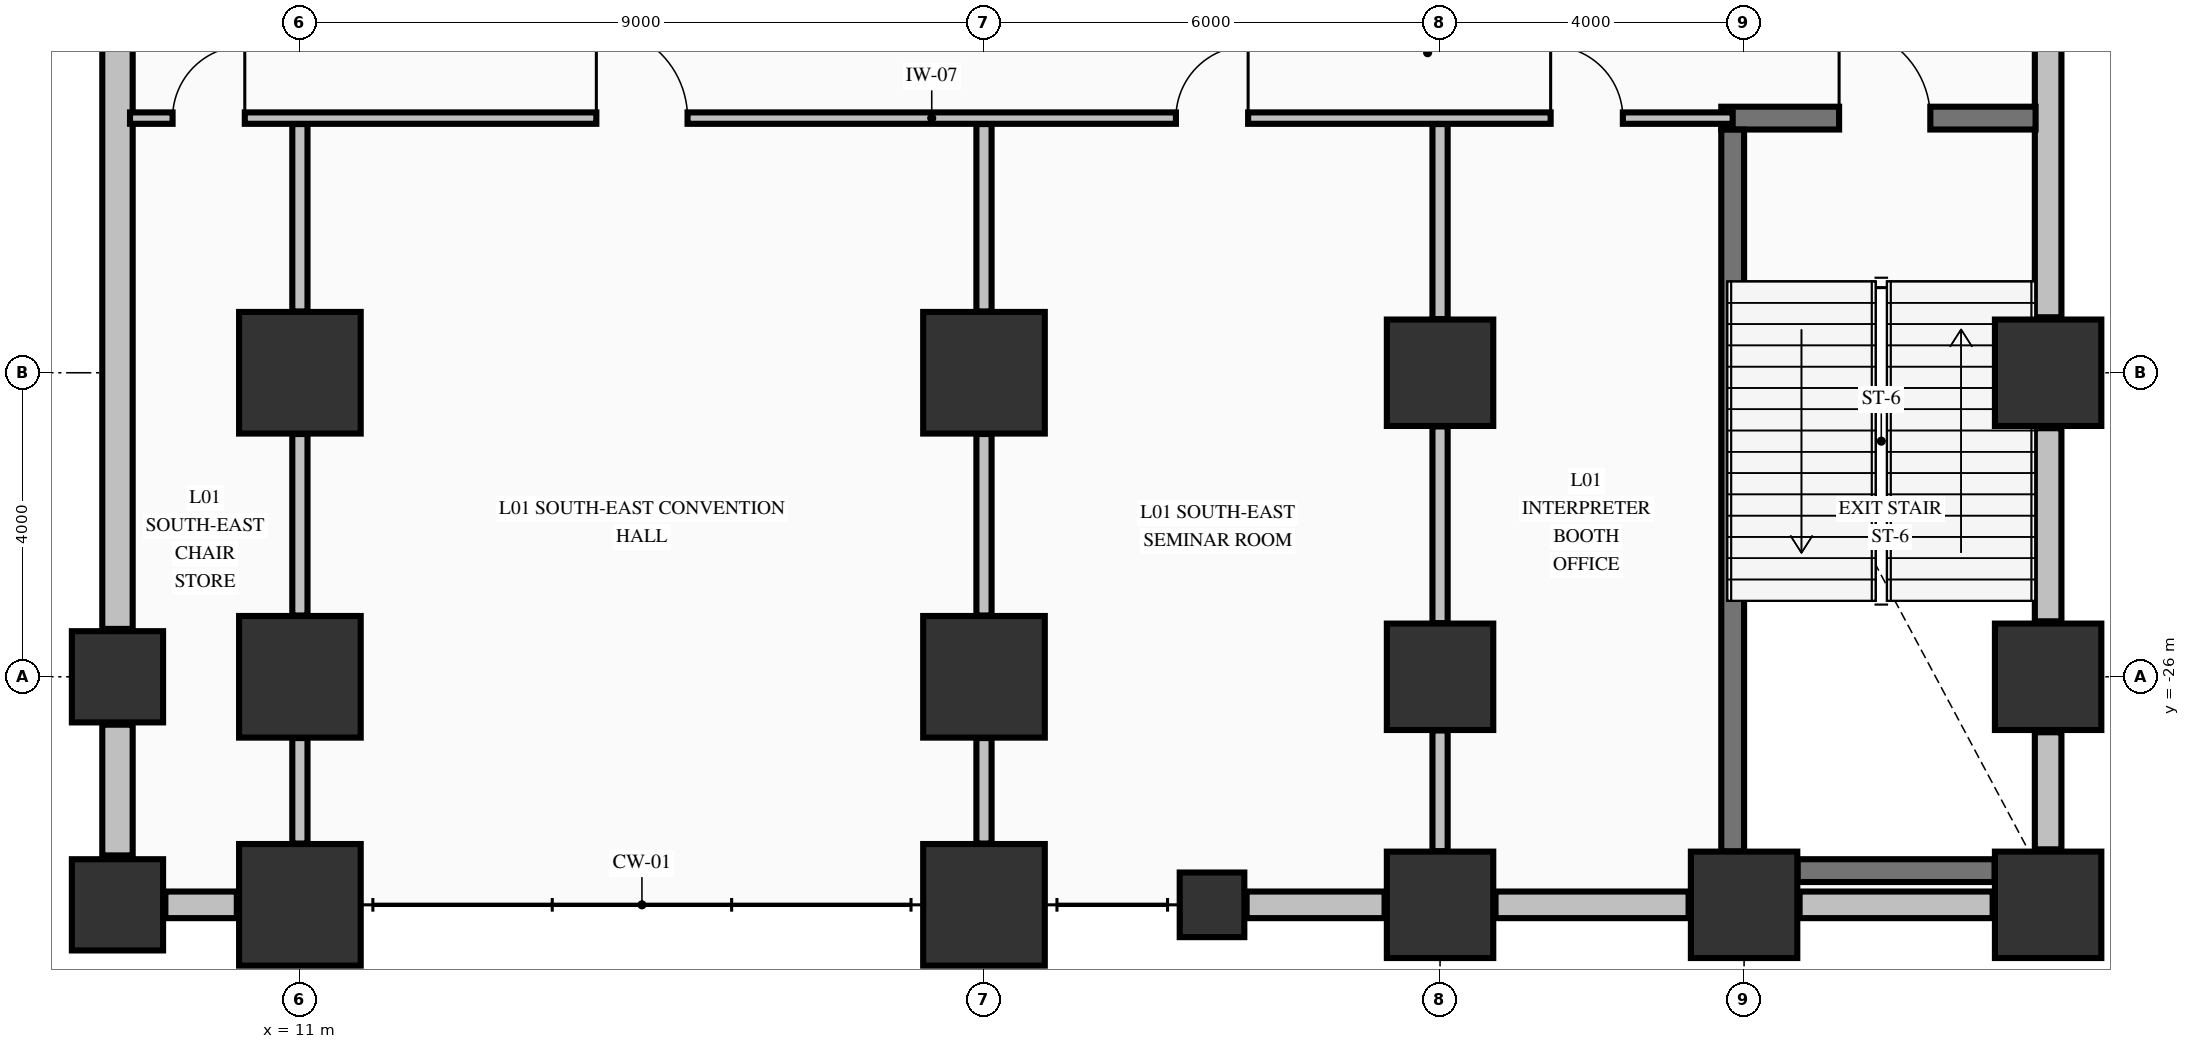
"""IFC4 building model, lengths in metres.
Left out: names, types, materials, properties, quantities, classifications, styles, units other than length and angle.
Written with IfcOpenShell. Run it as: python <this file> out.ifc"""

import sys

from ifc_helpers import new_model, si_unit, direction, frame, frame_2d, origin, origin_2d, place, context, subcontext, project, spatial, rectangle, extrude, element, fill, save


model = new_model("IFC4")
c1 = context("Model", 3, precision=1e-05, world=origin(), true_north=direction((0.0, 1.0)))
c2 = subcontext(c1, "Body", "Model", "MODEL_VIEW")
j1 = project(units=[si_unit("LENGTHUNIT", "METRE"), si_unit("PLANEANGLEUNIT", "RADIAN")], contexts=[c1])
p1 = place(None, origin())
s1 = spatial("IfcSite", under=j1, at=p1, CompositionType="ELEMENT")
p2 = place(p1, origin())
s2 = spatial("IfcBuilding", under=s1, at=p2, CompositionType="ELEMENT")
p3 = place(p2, frame((0.0, 0.0, 5.44)))
s3 = spatial("IfcBuildingStorey", under=s2, at=p3, CompositionType="ELEMENT", Elevation=5.44)
for number, where, z_axis, x_axis in (
    (1, (11.0, -29.0, 0.0), (0.0, 0.0, 1.0), (1.0, 0.0, 0.0)),
    (2, (11.0, -26.0, 0.0), (0.0, 0.0, 1.0), (1.0, 0.0, 0.0)),
    (3, (11.0, -22.0, 0.0), (0.0, 0.0, 1.0), (1.0, 0.0, 0.0)),
    (4, (20.0, -29.0, 0.0), (0.0, 0.0, 1.0), (1.0, 0.0, 0.0)),
    (5, (20.0, -26.0, 0.0), (0.0, 0.0, 1.0), (1.0, 0.0, 0.0)),
    (6, (20.0, -22.0, 0.0), (0.0, 0.0, 1.0), (1.0, 0.0, 0.0)),
):
    element("IfcColumn", number, at=place(p3, frame(where, z_axis=z_axis, x_axis=x_axis)), inside=s3, PredefinedType="COLUMN", context=c2, shape_type="SweptSolid", body=[
        extrude(rectangle(XDim=1.6, YDim=1.6, at=origin_2d()), origin(), (0.0, 0.0, 1.0), 5.09),
    ])
for number, where, z_axis, x_axis in (
    (7, (26.0, -29.0, 0.0), (0.0, 0.0, 1.0), (1.0, 0.0, 0.0)),
    (8, (26.0, -26.0, 0.0), (0.0, 0.0, 1.0), (1.0, 0.0, 0.0)),
    (9, (26.0, -22.0, 0.0), (0.0, 0.0, 1.0), (1.0, 0.0, 0.0)),
    (10, (30.0, -29.0, 0.0), (0.0, 0.0, 1.0), (1.0, 0.0, 0.0)),
    (11, (34.0, -29.0, 0.0), (0.0, 0.0, 1.0), (1.0, 0.0, 0.0)),
    (12, (34.0, -26.0, 0.0), (0.0, 0.0, 1.0), (1.0, 0.0, 0.0)),
    (13, (34.0, -22.0, 0.0), (0.0, 0.0, 1.0), (1.0, 0.0, 0.0)),
):
    element("IfcColumn", number, at=place(p3, frame(where, z_axis=z_axis, x_axis=x_axis)), inside=s3, PredefinedType="COLUMN", context=c2, shape_type="SweptSolid", body=[
        extrude(rectangle(XDim=1.4, YDim=1.4, at=origin_2d()), origin(), (0.0, 0.0, 1.0), 5.09),
    ])
for number, where, z_axis, x_axis in (
    (14, (8.6, -29.0, 0.0), (0.0, 0.0, 1.0), (1.0, 0.0, 0.0)),
    (15, (8.6, -26.0, 0.0), (0.0, 0.0, 1.0), (1.0, 0.0, 0.0)),
):
    element("IfcColumn", number, at=place(p3, frame(where, z_axis=z_axis, x_axis=x_axis)), inside=s3, PredefinedType="COLUMN", context=c2, shape_type="SweptSolid", body=[
        extrude(rectangle(XDim=1.2, YDim=1.2, at=origin_2d()), origin(), (0.0, 0.0, 1.0), 5.09),
    ])
p4 = place(p3, frame((23.0, -29.0, 0.0), z_axis=(0.0, 0.0, 1.0), x_axis=(1.0, 0.0, 0.0)))
e16 = element("IfcColumn", 16, at=p4, inside=s3, PredefinedType="PILASTER", context=c2, shape_type="SweptSolid", body=[
    extrude(rectangle(XDim=0.85, YDim=0.85, at=origin_2d()), origin(), (0.0, 0.0, 1.0), 5.09),
])
p5 = place(p3, frame((9.23, -29.0, 0.0), z_axis=(0.0, 0.0, 1.0), x_axis=(1.0, 0.0, 0.0)))
e17 = element("IfcWall", 17, at=p5, inside=s3, PredefinedType="STANDARD", context=c2, shape_type="SweptSolid", body=[
    extrude(rectangle(XDim=0.94, YDim=0.35, at=frame_2d((0.47, 0.0))), origin(), (0.0, 0.0, 1.0), 4.482),
])
p6 = place(p3, frame((23.455, -29.0, 0.0), z_axis=(0.0, 0.0, 1.0), x_axis=(1.0, 0.0, 0.0)))
e18 = element("IfcWall", 18, at=p6, inside=s3, PredefinedType="STANDARD", context=c2, shape_type="SweptSolid", body=[
    extrude(rectangle(XDim=1.815, YDim=0.35, at=frame_2d((0.907, 0.0))), origin(), (0.0, 0.0, 1.0), 4.482),
])
for number, where, z_axis, x_axis in (
    (19, (26.73, -29.0, 0.0), (0.0, 0.0, 1.0), (1.0, 0.0, 0.0)),
    (20, (30.73, -29.0, 0.0), (0.0, 0.0, 1.0), (1.0, 0.0, 0.0)),
):
    element("IfcWall", number, at=place(p3, frame(where, z_axis=z_axis, x_axis=x_axis)), inside=s3, PredefinedType="STANDARD", context=c2, shape_type="SweptSolid", body=[
        extrude(rectangle(XDim=2.54, YDim=0.35, at=frame_2d((1.27, 0.0))), origin(), (0.0, 0.0, 1.0), 4.482),
    ])
p7 = place(p3, frame((34.0, -26.73, 0.0), z_axis=(0.0, 0.0, 1.0), x_axis=(0.0, -1.0, 0.0)))
e21 = element("IfcWall", 21, at=p7, inside=s3, PredefinedType="STANDARD", context=c2, shape_type="SweptSolid", body=[
    extrude(rectangle(XDim=1.54, YDim=0.35, at=frame_2d((0.77, 0.0))), origin(), (0.0, 0.0, 1.0), 5.09),
])
p8 = place(p3, frame((34.0, -22.73, 0.0), z_axis=(0.0, 0.0, 1.0), x_axis=(0.0, -1.0, 0.0)))
e22 = element("IfcWall", 22, at=p8, inside=s3, PredefinedType="STANDARD", context=c2, shape_type="SweptSolid", body=[
    extrude(rectangle(XDim=2.54, YDim=0.35, at=frame_2d((1.27, 0.0))), origin(), (0.0, 0.0, 1.0), 5.09),
])
p9 = place(p3, frame((34.0, -16.73, 0.0), z_axis=(0.0, 0.0, 1.0), x_axis=(0.0, -1.0, 0.0)))
e23 = element("IfcWall", 23, at=p9, inside=s3, PredefinedType="STANDARD", context=c2, shape_type="SweptSolid", body=[
    extrude(rectangle(XDim=4.54, YDim=0.35, at=frame_2d((2.27, 0.0))), origin(), (0.0, 0.0, 1.0), 5.09),
])
p10 = place(p3, frame((8.6, -0.65, 0.0), z_axis=(0.0, 0.0, 1.0), x_axis=(0.0, -1.0, 0.0)))
e24 = element("IfcWall", 24, at=p10, inside=s3, PredefinedType="STANDARD", context=c2, shape_type="SweptSolid", body=[
    extrude(rectangle(XDim=24.72, YDim=0.4, at=frame_2d((12.36, 0.0))), origin(), (0.0, 0.0, 1.0), 4.132),
])
p11 = place(p3, frame((8.6, -26.63, 0.0), z_axis=(0.0, 0.0, 1.0), x_axis=(0.0, -1.0, 0.0)))
e25 = element("IfcWall", 25, at=p11, inside=s3, PredefinedType="STANDARD", context=c2, shape_type="SweptSolid", body=[
    extrude(rectangle(XDim=1.72, YDim=0.4, at=frame_2d((0.86, 0.0))), origin(), (0.0, 0.0, 1.0), 4.132),
])
p12 = place(p3, frame((30.704, -28.55, 0.0), z_axis=(0.0, 0.0, 1.0), x_axis=(1.0, 0.0, 0.0)))
e26 = element("IfcWall", 26, at=p12, inside=s3, PredefinedType="SHEAR", context=c2, shape_type="SweptSolid", body=[
    extrude(rectangle(XDim=2.592, YDim=0.3, at=frame_2d((1.296, 0.0))), origin(), (0.0, 0.0, 1.0), 5.09),
])
p13 = place(p3, frame((29.7, -18.65, 0.0), z_axis=(0.0, 0.0, 1.0), x_axis=(1.0, 0.0, 0.0)))
e27 = element("IfcWall", 27, at=p13, inside=s3, PredefinedType="SHEAR", context=c2, shape_type="SweptSolid", body=[
    extrude(rectangle(XDim=4.135, YDim=0.3, at=frame_2d((2.067, 0.0))), origin(), (0.0, 0.0, 1.0), 5.09),
])
p14 = place(p13, frame((1.55, 0.0, 0.0)))
e28 = element("IfcOpeningElement", 28, at=p14, cuts=e27, PredefinedType="OPENING", context=c2, shape_type="SweptSolid", body=[
    extrude(rectangle(XDim=1.2, YDim=2.15, at=frame_2d((0.6, 1.075))), frame((0.0, 0.16, 0.0), z_axis=(0.0, -1.0, 0.0), x_axis=(1.0, 0.0, 0.0)), (0.0, 0.0, 1.0), 0.32),
])
p15 = place(p3, frame((8.765, -18.65, 0.0), z_axis=(0.0, 0.0, 1.0), x_axis=(1.0, 0.0, 0.0)))
e29 = element("IfcWall", 29, at=p15, inside=s3, PredefinedType="PARTITIONING", context=c2, shape_type="SweptSolid", body=[
    extrude(rectangle(XDim=21.085, YDim=0.15, at=frame_2d((10.542, 0.0))), origin(), (0.0, 0.0, 1.0), 5.09),
])
p16 = place(p15, frame((0.56, 0.0, 0.0)))
e30 = element("IfcOpeningElement", 30, at=p16, cuts=e29, PredefinedType="OPENING", context=c2, shape_type="SweptSolid", body=[
    extrude(rectangle(XDim=0.95, YDim=2.15, at=frame_2d((0.475, 1.075))), frame((0.0, 0.085, 0.0), z_axis=(0.0, -1.0, 0.0), x_axis=(1.0, 0.0, 0.0)), (0.0, 0.0, 1.0), 0.17),
])
p17 = place(p15, frame((6.135, 0.0, 0.0)))
e31 = element("IfcOpeningElement", 31, at=p17, cuts=e29, PredefinedType="OPENING", context=c2, shape_type="SweptSolid", body=[
    extrude(rectangle(XDim=1.2, YDim=2.15, at=frame_2d((0.6, 1.075))), frame((0.0, 0.085, 0.0), z_axis=(0.0, -1.0, 0.0), x_axis=(1.0, 0.0, 0.0)), (0.0, 0.0, 1.0), 0.17),
])
p18 = place(p15, frame((13.76, 0.0, 0.0)))
e32 = element("IfcOpeningElement", 32, at=p18, cuts=e29, PredefinedType="OPENING", context=c2, shape_type="SweptSolid", body=[
    extrude(rectangle(XDim=0.95, YDim=2.15, at=frame_2d((0.475, 1.075))), frame((0.0, 0.085, 0.0), z_axis=(0.0, -1.0, 0.0), x_axis=(1.0, 0.0, 0.0)), (0.0, 0.0, 1.0), 0.17),
])
p19 = place(p15, frame((18.69, 0.0, 0.0)))
e33 = element("IfcOpeningElement", 33, at=p19, cuts=e29, PredefinedType="OPENING", context=c2, shape_type="SweptSolid", body=[
    extrude(rectangle(XDim=0.95, YDim=2.15, at=frame_2d((0.475, 1.075))), frame((0.0, 0.085, 0.0), z_axis=(0.0, -1.0, 0.0), x_axis=(1.0, 0.0, 0.0)), (0.0, 0.0, 1.0), 0.17),
])
p20 = place(p3, frame((29.85, -28.296, 0.0), z_axis=(0.0, 0.0, 1.0), x_axis=(0.0, 1.0, 0.0)))
e34 = element("IfcWall", 34, at=p20, inside=s3, PredefinedType="SHEAR", context=c2, shape_type="SweptSolid", body=[
    extrude(rectangle(XDim=9.494, YDim=0.3, at=frame_2d((4.747, 0.0))), origin(), (0.0, 0.0, 1.0), 5.09),
])
p21 = place(p3, frame((11.0, -28.194, 0.0), z_axis=(0.0, 0.0, 1.0), x_axis=(0.0, 1.0, 0.0)))
e35 = element("IfcWall", 35, at=p21, inside=s3, PredefinedType="PARTITIONING", context=c2, shape_type="SweptSolid", body=[
    extrude(rectangle(XDim=1.388, YDim=0.2, at=frame_2d((0.694, 0.0))), origin(), (0.0, 0.0, 1.0), 4.132),
])
p22 = place(p3, frame((11.0, -25.194, 0.0), z_axis=(0.0, 0.0, 1.0), x_axis=(0.0, 1.0, 0.0)))
e36 = element("IfcWall", 36, at=p22, inside=s3, PredefinedType="PARTITIONING", context=c2, shape_type="SweptSolid", body=[
    extrude(rectangle(XDim=2.388, YDim=0.2, at=frame_2d((1.194, 0.0))), origin(), (0.0, 0.0, 1.0), 4.132),
])
p23 = place(p3, frame((11.0, -21.194, 0.0), z_axis=(0.0, 0.0, 1.0), x_axis=(0.0, 1.0, 0.0)))
e37 = element("IfcWall", 37, at=p23, inside=s3, PredefinedType="PARTITIONING", context=c2, shape_type="SweptSolid", body=[
    extrude(rectangle(XDim=2.466, YDim=0.2, at=frame_2d((1.233, 0.0))), origin(), (0.0, 0.0, 1.0), 4.132),
])
p24 = place(p3, frame((20.0, -28.194, 0.0), z_axis=(0.0, 0.0, 1.0), x_axis=(0.0, 1.0, 0.0)))
e38 = element("IfcWall", 38, at=p24, inside=s3, PredefinedType="PARTITIONING", context=c2, shape_type="SweptSolid", body=[
    extrude(rectangle(XDim=1.388, YDim=0.2, at=frame_2d((0.694, 0.0))), origin(), (0.0, 0.0, 1.0), 4.132),
])
p25 = place(p3, frame((20.0, -25.194, 0.0), z_axis=(0.0, 0.0, 1.0), x_axis=(0.0, 1.0, 0.0)))
e39 = element("IfcWall", 39, at=p25, inside=s3, PredefinedType="PARTITIONING", context=c2, shape_type="SweptSolid", body=[
    extrude(rectangle(XDim=2.388, YDim=0.2, at=frame_2d((1.194, 0.0))), origin(), (0.0, 0.0, 1.0), 4.132),
])
p26 = place(p3, frame((20.0, -21.194, 0.0), z_axis=(0.0, 0.0, 1.0), x_axis=(0.0, 1.0, 0.0)))
e40 = element("IfcWall", 40, at=p26, inside=s3, PredefinedType="PARTITIONING", context=c2, shape_type="SweptSolid", body=[
    extrude(rectangle(XDim=2.466, YDim=0.2, at=frame_2d((1.233, 0.0))), origin(), (0.0, 0.0, 1.0), 4.132),
])
p27 = place(p3, frame((26.0, -28.294, 0.0), z_axis=(0.0, 0.0, 1.0), x_axis=(0.0, 1.0, 0.0)))
e41 = element("IfcWall", 41, at=p27, inside=s3, PredefinedType="PARTITIONING", context=c2, shape_type="SweptSolid", body=[
    extrude(rectangle(XDim=1.588, YDim=0.2, at=frame_2d((0.794, 0.0))), origin(), (0.0, 0.0, 1.0), 4.132),
])
p28 = place(p3, frame((26.0, -25.294, 0.0), z_axis=(0.0, 0.0, 1.0), x_axis=(0.0, 1.0, 0.0)))
e42 = element("IfcWall", 42, at=p28, inside=s3, PredefinedType="PARTITIONING", context=c2, shape_type="SweptSolid", body=[
    extrude(rectangle(XDim=2.588, YDim=0.2, at=frame_2d((1.294, 0.0))), origin(), (0.0, 0.0, 1.0), 4.132),
])
p29 = place(p3, frame((26.0, -21.294, 0.0), z_axis=(0.0, 0.0, 1.0), x_axis=(0.0, 1.0, 0.0)))
e43 = element("IfcWall", 43, at=p29, inside=s3, PredefinedType="PARTITIONING", context=c2, shape_type="SweptSolid", body=[
    extrude(rectangle(XDim=2.566, YDim=0.2, at=frame_2d((1.283, 0.0))), origin(), (0.0, 0.0, 1.0), 4.132),
])
p30 = place(p14, origin())
e44 = element("IfcDoor", 44, at=p30, inside=s3, OperationType="SINGLE_SWING_LEFT", PredefinedType="DOOR", context=c2, shape_type="SweptSolid", body=[
    extrude(rectangle(XDim=1.2, YDim=2.15, at=frame_2d((0.6, 1.075))), frame((0.0, 0.025, 0.0), z_axis=(0.0, -1.0, 0.0), x_axis=(1.0, 0.0, 0.0)), (0.0, 0.0, 1.0), 0.05),
])
fill(e28, e44)
p31 = place(p16, origin())
e45 = element("IfcDoor", 45, at=p31, inside=s3, OperationType="SINGLE_SWING_RIGHT", PredefinedType="DOOR", context=c2, shape_type="SweptSolid", body=[
    extrude(rectangle(XDim=0.95, YDim=2.15, at=frame_2d((0.475, 1.075))), frame((0.0, 0.025, 0.0), z_axis=(0.0, -1.0, 0.0), x_axis=(1.0, 0.0, 0.0)), (0.0, 0.0, 1.0), 0.05),
])
fill(e30, e45)
p32 = place(p17, origin())
e46 = element("IfcDoor", 46, at=p32, inside=s3, OperationType="SINGLE_SWING_LEFT", PredefinedType="DOOR", context=c2, shape_type="SweptSolid", body=[
    extrude(rectangle(XDim=1.2, YDim=2.15, at=frame_2d((0.6, 1.075))), frame((0.0, 0.025, 0.0), z_axis=(0.0, -1.0, 0.0), x_axis=(1.0, 0.0, 0.0)), (0.0, 0.0, 1.0), 0.05),
])
fill(e31, e46)
p33 = place(p18, origin())
e47 = element("IfcDoor", 47, at=p33, inside=s3, OperationType="SINGLE_SWING_RIGHT", PredefinedType="DOOR", context=c2, shape_type="SweptSolid", body=[
    extrude(rectangle(XDim=0.95, YDim=2.15, at=frame_2d((0.475, 1.075))), frame((0.0, 0.025, 0.0), z_axis=(0.0, -1.0, 0.0), x_axis=(1.0, 0.0, 0.0)), (0.0, 0.0, 1.0), 0.05),
])
fill(e32, e47)
p34 = place(p19, origin())
e48 = element("IfcDoor", 48, at=p34, inside=s3, OperationType="SINGLE_SWING_LEFT", PredefinedType="DOOR", context=c2, shape_type="SweptSolid", body=[
    extrude(rectangle(XDim=0.95, YDim=2.15, at=frame_2d((0.475, 1.075))), frame((0.0, 0.025, 0.0), z_axis=(0.0, -1.0, 0.0), x_axis=(1.0, 0.0, 0.0)), (0.0, 0.0, 1.0), 0.05),
])
fill(e33, e48)
save(model, sys.argv[1])
